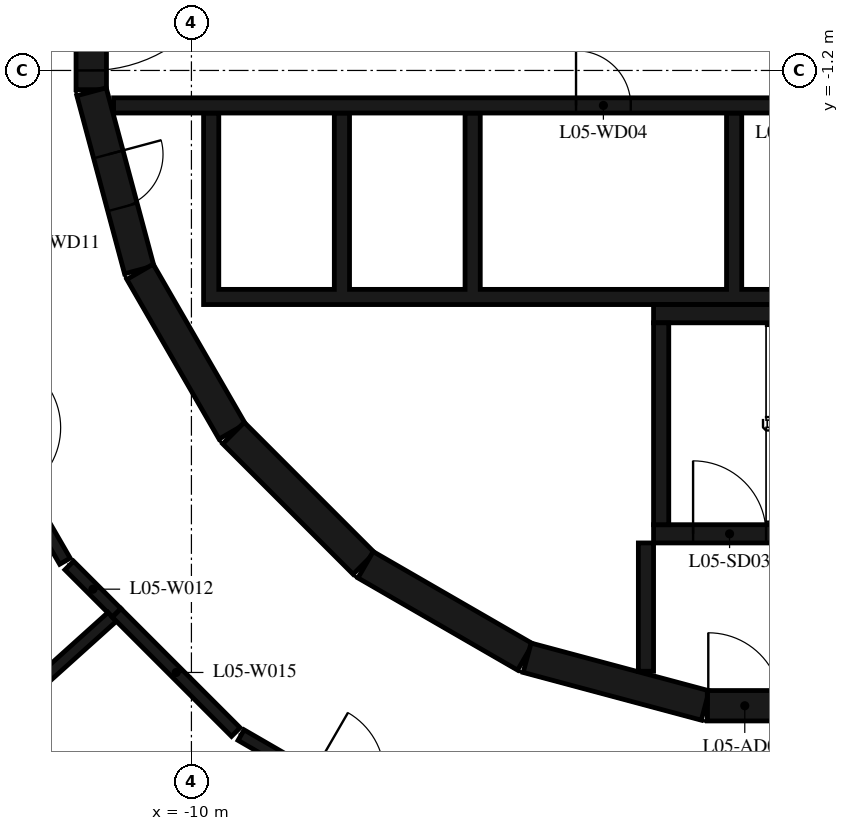
"""IFC4 building model, lengths in metres.
Left out: names, types, materials, properties, quantities, classifications, styles, units other than length and angle.
Written with IfcOpenShell. Run it as: python <this file> out.ifc"""

import sys

from ifc_helpers import new_model, si_unit, direction, frame, frame_2d, origin, place, context, subcontext, project, spatial, polyline, rectangle, outline, extrude, element, fill, save


model = new_model("IFC4")
c1 = context("Model", 3, precision=1e-05, world=origin(), true_north=direction((0.0, 1.0)))
c2 = subcontext(c1, "Body", "Model", "MODEL_VIEW")
j1 = project(units=[si_unit("LENGTHUNIT", "METRE"), si_unit("PLANEANGLEUNIT", "RADIAN")], contexts=[c1])
p1 = place(None, origin())
s1 = spatial("IfcSite", under=j1, at=p1, CompositionType="ELEMENT")
p2 = place(p1, origin())
s2 = spatial("IfcBuilding", under=s1, at=p2, CompositionType="ELEMENT")
p3 = place(p2, frame((0.0, 0.0, 28.2)))
s3 = spatial("IfcBuildingStorey", under=s2, at=p3, CompositionType="ELEMENT", Elevation=28.2)
p4 = place(p3, frame((-11.647, 1.516, 0.0), z_axis=(0.0, 0.0, 1.0), x_axis=(0.0, -1.0, 0.0)))
e1 = element("IfcWall", 1, at=p4, inside=s3, PredefinedType="SHEAR", context=c2, shape_type="SweptSolid", body=[
    extrude(rectangle(XDim=3.033, YDim=0.5, at=frame_2d((1.516, 0.0))), origin(), (0.0, 0.0, 1.0), 4.35),
])
p5 = place(p4, frame((0.316, 0.0, 0.0)))
e2 = element("IfcOpeningElement", 2, at=p5, cuts=e1, PredefinedType="OPENING", context=c2, shape_type="SweptSolid", body=[
    extrude(rectangle(XDim=2.4, YDim=2.1, at=frame_2d((1.2, 1.05))), frame((0.0, 0.26, 0.0), z_axis=(0.0, -1.0, 0.0), x_axis=(1.0, 0.0, 0.0)), (0.0, 0.0, 1.0), 0.52),
])
p6 = place(p3, frame((-11.643, -1.55, 0.0), z_axis=(0.0, 0.0, 1.0), x_axis=(0.258734743916, -0.965948410781, 0.0)))
e3 = element("IfcWall", 3, at=p6, inside=s3, PredefinedType="SHEAR", context=c2, shape_type="SweptSolid", body=[
    extrude(rectangle(XDim=3.033, YDim=0.5, at=frame_2d((1.516, 0.0))), origin(), (0.0, 0.0, 1.0), 4.35),
])
p7 = place(p6, frame((1.066, 0.0, 0.0)))
e4 = element("IfcOpeningElement", 4, at=p7, cuts=e3, PredefinedType="OPENING", context=c2, shape_type="SweptSolid", body=[
    extrude(rectangle(XDim=0.9, YDim=2.1, at=frame_2d((0.45, 1.05))), frame((0.0, 0.26, 0.0), z_axis=(0.0, -1.0, 0.0), x_axis=(1.0, 0.0, 0.0)), (0.0, 0.0, 1.0), 0.52),
])
p8 = place(p3, frame((-10.845, -4.51, 0.0), z_axis=(0.0, 0.0, 1.0), x_axis=(0.500087131594, -0.865975092491, 0.0)))
e5 = element("IfcWall", 5, at=p8, inside=s3, PredefinedType="SHEAR", context=c2, shape_type="SweptSolid", body=[
    extrude(rectangle(XDim=3.033, YDim=0.5, at=frame_2d((1.516, 0.0))), origin(), (0.0, 0.0, 1.0), 4.35),
])
p9 = place(p3, frame((-9.308, -7.164, 0.0), z_axis=(0.0, 0.0, 1.0), x_axis=(0.707106781187, -0.707106781187, 0.0)))
e6 = element("IfcWall", 6, at=p9, inside=s3, PredefinedType="SHEAR", context=c2, shape_type="SweptSolid", body=[
    extrude(rectangle(XDim=3.032, YDim=0.5, at=frame_2d((1.516, 0.0))), origin(), (0.0, 0.0, 1.0), 4.35),
])
for number, where, z_axis, x_axis in (
    (7, (-7.137, -9.329, 0.0), (0.0, 0.0, 1.0), (0.866, -0.5, 0.0)),
    (8, (-4.479, -10.858, 0.0), (0.0, 0.0, 1.0), (0.966, -0.259, 0.0)),
):
    element("IfcWall", number, at=place(p3, frame(where, z_axis=z_axis, x_axis=x_axis)), inside=s3, PredefinedType="SHEAR", context=c2, shape_type="SweptSolid", body=[
        extrude(rectangle(XDim=3.033, YDim=0.5, at=frame_2d((1.516, 0.0))), origin(), (0.0, 0.0, 1.0), 4.35),
    ])
p10 = place(p3, frame((-1.516, -11.647, 0.0), z_axis=(0.0, 0.0, 1.0), x_axis=(1.0, 0.0, 0.0)))
e9 = element("IfcWall", 9, at=p10, inside=s3, PredefinedType="SHEAR", context=c2, shape_type="SweptSolid", body=[
    extrude(rectangle(XDim=3.033, YDim=0.5, at=frame_2d((1.516, 0.0))), origin(), (0.0, 0.0, 1.0), 4.35),
])
p11 = place(p10, frame((0.016, 0.0, 0.0)))
e10 = element("IfcOpeningElement", 10, at=p11, cuts=e9, PredefinedType="OPENING", context=c2, shape_type="SweptSolid", body=[
    extrude(rectangle(XDim=1.2, YDim=2.1, at=frame_2d((0.6, 1.05))), frame((0.0, 0.26, 0.0), z_axis=(0.0, -1.0, 0.0), x_axis=(1.0, 0.0, 0.0)), (0.0, 0.0, 1.0), 0.52),
])
p12 = place(p3, frame((-2.275, -8.67, 0.0), z_axis=(0.0, 0.0, 1.0), x_axis=(0.0, 1.0, 0.0)))
e11 = element("IfcWall", 11, at=p12, inside=s3, PredefinedType="SHEAR", context=c2, shape_type="SweptSolid", body=[
    extrude(rectangle(XDim=3.32, YDim=0.25, at=frame_2d((1.66, 0.0))), origin(), (0.0, 0.0, 1.0), 4.35),
])
p13 = place(p3, frame((-2.4, -5.2, 0.0), z_axis=(0.0, 0.0, 1.0), x_axis=(1.0, 0.0, 0.0)))
e12 = element("IfcWall", 12, at=p13, inside=s3, PredefinedType="SHEAR", context=c2, shape_type="SweptSolid", body=[
    extrude(rectangle(XDim=7.05, YDim=0.3, at=frame_2d((3.525, 0.0))), origin(), (0.0, 0.0, 1.0), 4.35),
])
p14 = place(p3, frame((-2.4, -8.82, 0.0), z_axis=(0.0, 0.0, 1.0), x_axis=(1.0, 0.0, 0.0)))
e13 = element("IfcWall", 13, at=p14, inside=s3, PredefinedType="SHEAR", context=c2, shape_type="SweptSolid", body=[
    extrude(rectangle(XDim=2.5, YDim=0.3, at=frame_2d((1.25, 0.0))), origin(), (0.0, 0.0, 1.0), 4.35),
])
p15 = place(p14, frame((0.65, 0.0, 0.0)))
e14 = element("IfcOpeningElement", 14, at=p15, cuts=e13, PredefinedType="OPENING", context=c2, shape_type="SweptSolid", body=[
    extrude(rectangle(XDim=1.2, YDim=2.1, at=frame_2d((0.6, 1.05))), frame((0.0, 0.16, 0.0), z_axis=(0.0, -1.0, 0.0), x_axis=(1.0, 0.0, 0.0)), (0.0, 0.0, 1.0), 0.32),
])
p16 = place(p3, frame((-2.525, -8.97, 0.0), z_axis=(0.0, 0.0, 1.0), x_axis=(0.0, -1.0, 0.0)))
e15 = element("IfcWall", 15, at=p16, inside=s3, PredefinedType="SHEAR", context=c2, shape_type="SweptSolid", body=[
    extrude(rectangle(XDim=2.11, YDim=0.25, at=frame_2d((1.055, 0.0))), origin(), (0.0, 0.0, 1.0), 4.35),
])
p17 = place(p3, origin())
e16 = element("IfcWall", 16, at=p17, inside=s3, PredefinedType="SHEAR", context=c2, shape_type="SweptSolid", body=[
    extrude(outline(polyline([(9.8, -5.05), (9.8, -4.8), (9.8, -1.9), (9.55, -1.9), (9.55, -4.8), (7.65, -4.8), (7.65, -1.9), (7.4, -1.9), (7.4, -4.8), (5.5, -4.8), (5.5, -1.9), (5.25, -1.9), (5.25, -4.8), (3.35, -4.8), (3.35, -1.9), (3.1, -1.9), (3.1, -4.8), (1.2, -4.8), (1.2, -1.9), (0.95, -1.9), (0.95, -4.8), (-0.95, -4.8), (-0.95, -1.9), (-1.2, -1.9), (-1.2, -4.8), (-5.25, -4.8), (-5.25, -1.9), (-5.5, -1.9), (-5.5, -4.8), (-7.4, -4.8), (-7.4, -1.9), (-7.65, -1.9), (-7.65, -4.8), (-9.55, -4.8), (-9.55, -1.9), (-9.8, -1.9), (-9.8, -4.8), (-9.8, -5.05), (9.8, -5.05)])), origin(), (0.0, 0.0, 1.0), 4.35),
])
p18 = place(p3, frame((-11.28, -1.775, 0.0), z_axis=(0.0, 0.0, 1.0), x_axis=(1.0, 0.0, 0.0)))
e17 = element("IfcWall", 17, at=p18, inside=s3, PredefinedType="SHEAR", context=c2, shape_type="SweptSolid", body=[
    extrude(rectangle(XDim=14.38, YDim=0.25, at=frame_2d((7.19, 0.0))), origin(), (0.0, 0.0, 1.0), 4.35),
])
p19 = place(p18, frame((7.605, 0.0, 0.0)))
e18 = element("IfcOpeningElement", 18, at=p19, cuts=e17, PredefinedType="OPENING", context=c2, shape_type="SweptSolid", body=[
    extrude(rectangle(XDim=0.9, YDim=2.1, at=frame_2d((0.45, 1.05))), frame((0.0, 0.135, 0.0), z_axis=(0.0, -1.0, 0.0), x_axis=(1.0, 0.0, 0.0)), (0.0, 0.0, 1.0), 0.27),
])
p20 = place(p18, frame((10.83, 0.0, 0.0)))
e19 = element("IfcOpeningElement", 19, at=p20, cuts=e17, PredefinedType="OPENING", context=c2, shape_type="SweptSolid", body=[
    extrude(rectangle(XDim=0.9, YDim=2.1, at=frame_2d((0.45, 1.05))), frame((0.0, 0.135, 0.0), z_axis=(0.0, -1.0, 0.0), x_axis=(1.0, 0.0, 0.0)), (0.0, 0.0, 1.0), 0.27),
])
p21 = place(p18, frame((12.98, 0.0, 0.0)))
e20 = element("IfcOpeningElement", 20, at=p21, cuts=e17, PredefinedType="OPENING", context=c2, shape_type="SweptSolid", body=[
    extrude(rectangle(XDim=0.9, YDim=2.1, at=frame_2d((0.45, 1.05))), frame((0.0, 0.135, 0.0), z_axis=(0.0, -1.0, 0.0), x_axis=(1.0, 0.0, 0.0)), (0.0, 0.0, 1.0), 0.27),
])
p22 = place(p3, frame((-14.02, -5.917, 0.0), z_axis=(0.0, 0.0, 1.0), x_axis=(0.500733182901, -0.865601686425, 0.0)))
e21 = element("IfcWall", 21, at=p22, inside=s3, PredefinedType="PARTITIONING", context=c2, shape_type="SweptSolid", body=[
    extrude(rectangle(XDim=3.874, YDim=0.2, at=frame_2d((1.937, 0.0))), origin(), (0.0, 0.0, 1.0), 4.35),
])
p23 = place(p22, frame((1.337, 0.0, 0.0)))
e22 = element("IfcOpeningElement", 22, at=p23, cuts=e21, PredefinedType="OPENING", context=c2, shape_type="SweptSolid", body=[
    extrude(rectangle(XDim=1.2, YDim=2.1, at=frame_2d((0.6, 1.05))), frame((0.0, 0.11, 0.0), z_axis=(0.0, -1.0, 0.0), x_axis=(1.0, 0.0, 0.0)), (0.0, 0.0, 1.0), 0.22),
])
p24 = place(p3, frame((-12.009, -9.341, 0.0), z_axis=(0.0, 0.0, 1.0), x_axis=(0.707106781187, -0.707106781187, 0.0)))
e23 = element("IfcWall", 23, at=p24, inside=s3, PredefinedType="PARTITIONING", context=c2, shape_type="SweptSolid", body=[
    extrude(rectangle(XDim=1.102, YDim=0.2, at=frame_2d((0.551, 0.0))), origin(), (0.0, 0.0, 1.0), 4.35),
])
p25 = place(p3, frame((-11.304, -10.187, 0.0), z_axis=(0.0, 0.0, 1.0), x_axis=(-0.743362442769, -0.668888838807, 0.0)))
e24 = element("IfcWall", 24, at=p25, inside=s3, PredefinedType="PARTITIONING", context=c2, shape_type="SweptSolid", body=[
    extrude(rectangle(XDim=13.864, YDim=0.2, at=frame_2d((6.932, 0.0))), origin(), (0.0, 0.0, 1.0), 4.35),
])
p26 = place(p3, frame((-11.23, -10.12, 0.0), z_axis=(0.0, 0.0, 1.0), x_axis=(0.707106781187, -0.707106781187, 0.0)))
e25 = element("IfcWall", 25, at=p26, inside=s3, PredefinedType="PARTITIONING", context=c2, shape_type="SweptSolid", body=[
    extrude(rectangle(XDim=2.772, YDim=0.2, at=frame_2d((1.386, 0.0))), origin(), (0.0, 0.0, 1.0), 4.35),
])
p27 = place(p3, frame((-9.183, -12.13, 0.0), z_axis=(0.0, 0.0, 1.0), x_axis=(0.865585884642, -0.500760497952, 0.0)))
e26 = element("IfcWall", 26, at=p27, inside=s3, PredefinedType="PARTITIONING", context=c2, shape_type="SweptSolid", body=[
    extrude(rectangle(XDim=3.874, YDim=0.2, at=frame_2d((1.937, 0.0))), origin(), (0.0, 0.0, 1.0), 4.35),
])
p28 = place(p27, frame((1.337, 0.0, 0.0)))
e27 = element("IfcOpeningElement", 27, at=p28, cuts=e26, PredefinedType="OPENING", context=c2, shape_type="SweptSolid", body=[
    extrude(rectangle(XDim=1.2, YDim=2.1, at=frame_2d((0.6, 1.05))), frame((0.0, 0.11, 0.0), z_axis=(0.0, -1.0, 0.0), x_axis=(1.0, 0.0, 0.0)), (0.0, 0.0, 1.0), 0.22),
])
p29 = place(p15, origin())
e28 = element("IfcDoor", 28, at=p29, inside=s3, OperationType="SINGLE_SWING_LEFT", PredefinedType="DOOR", context=c2, shape_type="SweptSolid", body=[
    extrude(rectangle(XDim=1.2, YDim=2.1, at=frame_2d((0.6, 1.05))), frame((0.0, 0.025, 0.0), z_axis=(0.0, -1.0, 0.0), x_axis=(1.0, 0.0, 0.0)), (0.0, 0.0, 1.0), 0.05),
])
fill(e14, e28)
p30 = place(p11, origin())
e29 = element("IfcDoor", 29, at=p30, inside=s3, OperationType="SINGLE_SWING_RIGHT", PredefinedType="DOOR", context=c2, shape_type="SweptSolid", body=[
    extrude(rectangle(XDim=1.2, YDim=2.1, at=frame_2d((0.6, 1.05))), frame((0.0, 0.025, 0.0), z_axis=(0.0, -1.0, 0.0), x_axis=(1.0, 0.0, 0.0)), (0.0, 0.0, 1.0), 0.05),
])
fill(e10, e29)
p31 = place(p5, origin())
e30 = element("IfcDoor", 30, at=p31, inside=s3, OperationType="DOUBLE_DOOR_SINGLE_SWING", PredefinedType="DOOR", context=c2, shape_type="SweptSolid", body=[
    extrude(rectangle(XDim=2.4, YDim=2.1, at=frame_2d((1.2, 1.05))), frame((0.0, 0.025, 0.0), z_axis=(0.0, -1.0, 0.0), x_axis=(1.0, 0.0, 0.0)), (0.0, 0.0, 1.0), 0.05),
])
fill(e2, e30)
p32 = place(p19, origin())
e31 = element("IfcDoor", 31, at=p32, inside=s3, OperationType="SINGLE_SWING_LEFT", PredefinedType="DOOR", context=c2, shape_type="SweptSolid", body=[
    extrude(rectangle(XDim=0.9, YDim=2.1, at=frame_2d((0.45, 1.05))), frame((0.0, 0.025, 0.0), z_axis=(0.0, -1.0, 0.0), x_axis=(1.0, 0.0, 0.0)), (0.0, 0.0, 1.0), 0.05),
])
fill(e18, e31)
p33 = place(p7, origin())
e32 = element("IfcDoor", 32, at=p33, inside=s3, OperationType="SINGLE_SWING_RIGHT", PredefinedType="DOOR", context=c2, shape_type="SweptSolid", body=[
    extrude(rectangle(XDim=0.9, YDim=2.1, at=frame_2d((0.45, 1.05))), frame((0.0, 0.025, 0.0), z_axis=(0.0, -1.0, 0.0), x_axis=(1.0, 0.0, 0.0)), (0.0, 0.0, 1.0), 0.05),
])
fill(e4, e32)
save(model, sys.argv[1])
